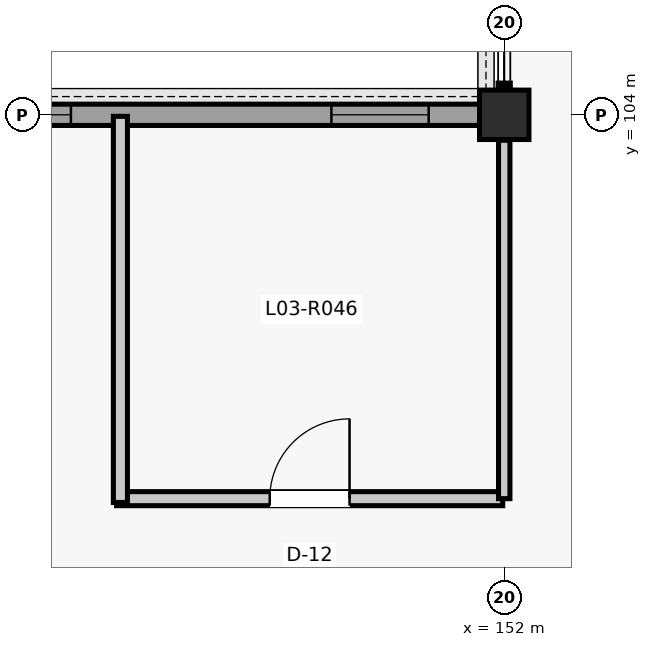
"""IFC4 building model, lengths in metres.
Left out: names, types, materials, properties, quantities, classifications, styles, units other than length and angle.
Written with IfcOpenShell. Run it as: python <this file> out.ifc"""

import sys

from ifc_helpers import new_model, si_unit, direction, frame, frame_2d, origin, origin_2d, place, context, subcontext, project, spatial, rectangle, extrude, element, fill, save


model = new_model("IFC4")
c1 = context("Model", 3, precision=1e-05, world=origin(), true_north=direction((0.0, 1.0)))
c2 = subcontext(c1, "Body", "Model", "MODEL_VIEW")
j1 = project(units=[si_unit("LENGTHUNIT", "METRE"), si_unit("PLANEANGLEUNIT", "RADIAN")], contexts=[c1])
p1 = place(None, origin())
s1 = spatial("IfcSite", under=j1, at=p1, CompositionType="ELEMENT")
p2 = place(p1, origin())
s2 = spatial("IfcBuilding", under=s1, at=p2, CompositionType="ELEMENT")
p3 = place(p2, frame((0.0, 0.0, 13.86)))
s3 = spatial("IfcBuildingStorey", under=s2, at=p3, CompositionType="ELEMENT", Elevation=13.86)
p4 = place(p3, frame((152.0, 104.0, 0.0), z_axis=(0.0, 0.0, 1.0), x_axis=(1.0, 0.0, 0.0)))
e1 = element("IfcColumn", 1, at=p4, inside=s3, PredefinedType="COLUMN", context=c2, shape_type="SweptSolid", body=[
    extrude(rectangle(XDim=0.65, YDim=0.65, at=origin_2d()), origin(), (0.0, 0.0, 1.0), 3.96),
])
p5 = place(p3, frame((144.335, 104.0, 0.0), z_axis=(0.0, 0.0, 1.0), x_axis=(1.0, 0.0, 0.0)))
e2 = element("IfcWall", 2, at=p5, inside=s3, PredefinedType="SOLIDWALL", context=c2, shape_type="SweptSolid", body=[
    extrude(rectangle(XDim=7.355, YDim=0.28, at=frame_2d((3.677, 0.0))), origin(), (0.0, 0.0, 1.0), 3.304),
])
p6 = place(p5, frame((0.684, 0.0, 0.95)))
e3 = element("IfcOpeningElement", 3, at=p6, cuts=e2, PredefinedType="OPENING", context=c2, shape_type="SweptSolid", body=[
    extrude(rectangle(XDim=1.28, YDim=1.72, at=frame_2d((0.64, 0.86))), frame((0.0, 0.15, 0.0), z_axis=(0.0, -1.0, 0.0), x_axis=(1.0, 0.0, 0.0)), (0.0, 0.0, 1.0), 0.3),
])
p7 = place(p5, frame((5.391, 0.0, 0.95)))
e4 = element("IfcOpeningElement", 4, at=p7, cuts=e2, PredefinedType="OPENING", context=c2, shape_type="SweptSolid", body=[
    extrude(rectangle(XDim=1.28, YDim=1.72, at=frame_2d((0.64, 0.86))), frame((0.0, 0.15, 0.0), z_axis=(0.0, -1.0, 0.0), x_axis=(1.0, 0.0, 0.0)), (0.0, 0.0, 1.0), 0.3),
])
p8 = place(p3, frame((146.9, 98.95, 0.0), z_axis=(0.0, 0.0, 1.0), x_axis=(1.0, 0.0, 0.0)))
e5 = element("IfcWall", 5, at=p8, inside=s3, PredefinedType="PARTITIONING", context=c2, shape_type="SweptSolid", body=[
    extrude(rectangle(XDim=5.08, YDim=0.185, at=frame_2d((2.54, 0.0))), origin(), (0.0, 0.0, 1.0), 3.253),
])
p9 = place(p8, frame((2.015, 0.0, 0.0)))
e6 = element("IfcOpeningElement", 6, at=p9, cuts=e5, PredefinedType="OPENING", context=c2, shape_type="SweptSolid", body=[
    extrude(rectangle(XDim=1.05, YDim=2.15, at=frame_2d((0.525, 1.075))), frame((0.0, 0.103, 0.0), z_axis=(0.0, -1.0, 0.0), x_axis=(1.0, 0.0, 0.0)), (0.0, 0.0, 1.0), 0.205),
])
p10 = place(p3, frame((146.95, 98.9, 0.0), z_axis=(0.0, 0.0, 1.0), x_axis=(0.0, 1.0, 0.0)))
e7 = element("IfcWall", 7, at=p10, inside=s3, PredefinedType="PARTITIONING", context=c2, shape_type="SweptSolid", body=[
    extrude(rectangle(XDim=5.08, YDim=0.185, at=frame_2d((2.54, 0.0))), origin(), (0.0, 0.0, 1.0), 3.297),
])
p11 = place(p3, frame((152.0, 98.95, 0.0), z_axis=(0.0, 0.0, 1.0), x_axis=(0.0, 1.0, 0.0)))
e8 = element("IfcWall", 8, at=p11, inside=s3, PredefinedType="PARTITIONING", context=c2, shape_type="SweptSolid", body=[
    extrude(rectangle(XDim=4.715, YDim=0.15, at=frame_2d((2.357, 0.0))), origin(), (0.0, 0.0, 1.0), 3.253),
])
p12 = place(p6, origin())
e9 = element("IfcWindow", 9, at=p12, inside=s3, PartitioningType="SINGLE_PANEL", PredefinedType="WINDOW", context=c2, shape_type="SweptSolid", body=[
    extrude(rectangle(XDim=1.28, YDim=1.72, at=frame_2d((0.64, 0.86))), frame((0.0, 0.03, 0.0), z_axis=(0.0, -1.0, 0.0), x_axis=(1.0, 0.0, 0.0)), (0.0, 0.0, 1.0), 0.06),
])
fill(e3, e9)
p13 = place(p7, origin())
e10 = element("IfcWindow", 10, at=p13, inside=s3, PartitioningType="SINGLE_PANEL", PredefinedType="WINDOW", context=c2, shape_type="SweptSolid", body=[
    extrude(rectangle(XDim=1.28, YDim=1.72, at=frame_2d((0.64, 0.86))), frame((0.0, 0.03, 0.0), z_axis=(0.0, -1.0, 0.0), x_axis=(1.0, 0.0, 0.0)), (0.0, 0.0, 1.0), 0.06),
])
fill(e4, e10)
p14 = place(p9, origin())
e11 = element("IfcDoor", 11, at=p14, inside=s3, OperationType="SINGLE_SWING_RIGHT", PredefinedType="DOOR", context=c2, shape_type="SweptSolid", body=[
    extrude(rectangle(XDim=1.05, YDim=2.15, at=frame_2d((0.525, 1.075))), frame((0.0, 0.025, 0.0), z_axis=(0.0, -1.0, 0.0), x_axis=(1.0, 0.0, 0.0)), (0.0, 0.0, 1.0), 0.05),
])
fill(e6, e11)
save(model, sys.argv[1])
